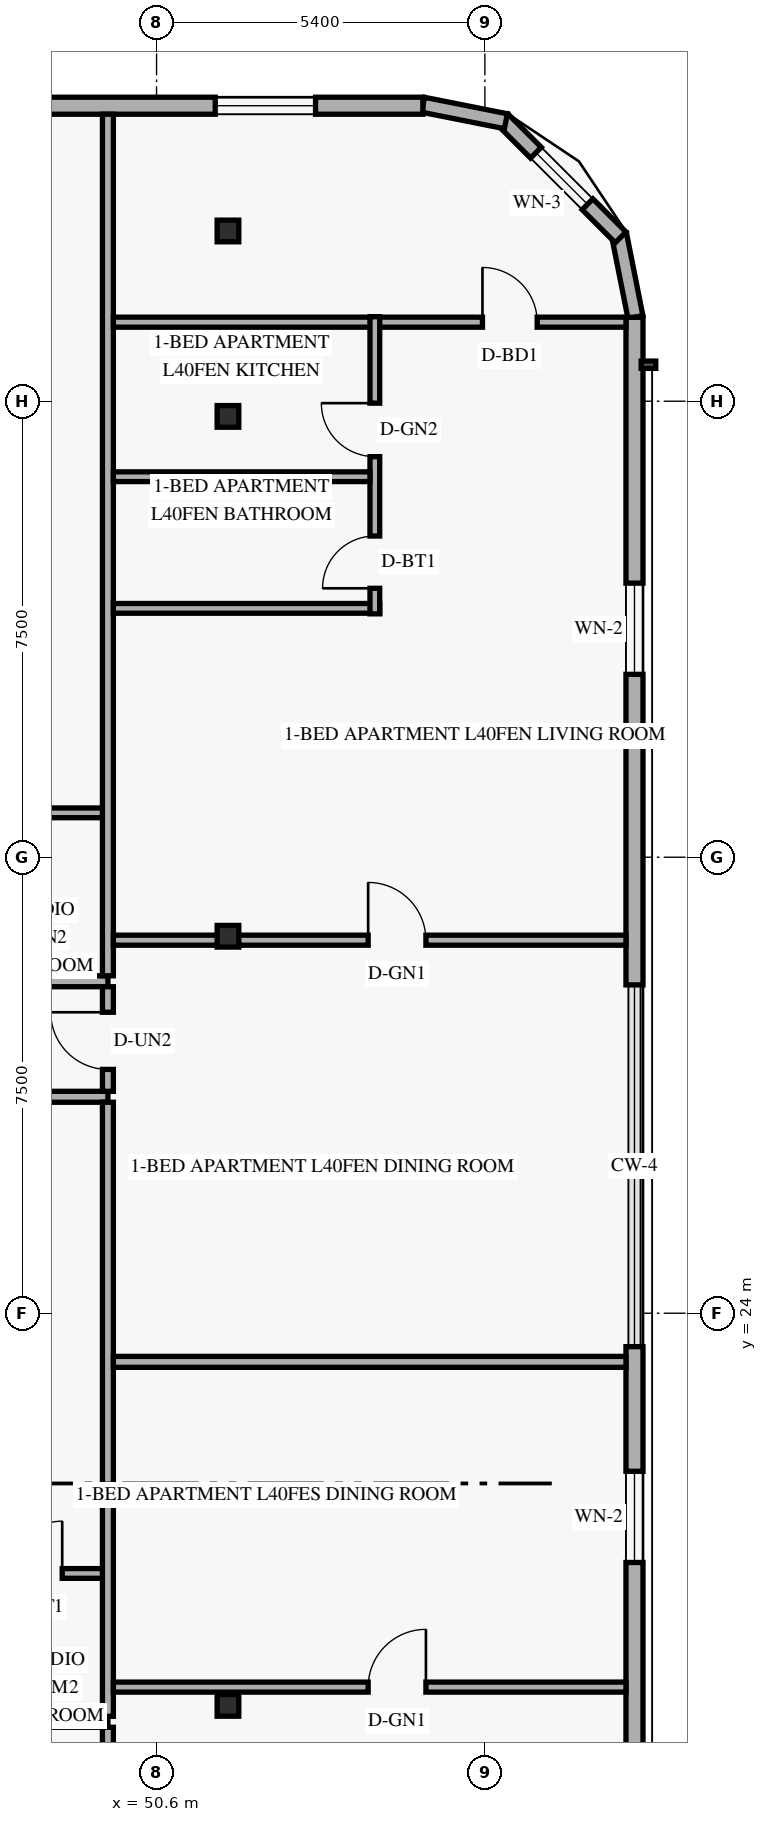
"""IFC4 building model, lengths in metres.
Left out: names, types, materials, properties, quantities, classifications, styles, units other than length and angle.
Written with IfcOpenShell. Run it as: python <this file> out.ifc"""

import sys

from ifc_helpers import new_model, si_unit, direction, frame, frame_2d, origin, origin_2d, place, context, subcontext, project, spatial, rectangle, hollow_rectangle, extrude, element, fill, save


model = new_model("IFC4")
c1 = context("Model", 3, precision=1e-05, world=origin(), true_north=direction((0.0, 1.0)))
c2 = subcontext(c1, "Body", "Model", "MODEL_VIEW")
j1 = project(units=[si_unit("LENGTHUNIT", "METRE"), si_unit("PLANEANGLEUNIT", "RADIAN")], contexts=[c1])
p1 = place(None, origin())
s1 = spatial("IfcSite", under=j1, at=p1, CompositionType="ELEMENT")
p2 = place(p1, origin())
s2 = spatial("IfcBuilding", under=s1, at=p2, CompositionType="ELEMENT")
p3 = place(p2, frame((0.0, 0.0, 155.4)))
s3 = spatial("IfcBuildingStorey", under=s2, at=p3, CompositionType="ELEMENT", Elevation=155.4)
for number, where, z_axis, x_axis in (
    (1, (51.67, 17.55, 0.0), (0.058, 0.0, 0.998), (0.0, 1.0, 0.0)),
    (2, (51.67, 30.2, 0.0), (0.058, 0.0, 0.998), (0.0, 1.0, 0.0)),
    (3, (51.67, 38.75, 0.0), (0.058, 0.0, 0.998), (0.0, 1.0, 0.0)),
    (4, (51.67, 41.8, 0.0), (0.058, 0.0, 0.998), (0.0, 1.0, 0.0)),
):
    element("IfcColumn", number, at=place(p3, frame(where, z_axis=z_axis, x_axis=x_axis)), inside=s3, PredefinedType="COLUMN", context=c2, shape_type="SweptSolid", body=[
        extrude(hollow_rectangle(XDim=0.356, YDim=0.356, WallThickness=0.016, at=origin_2d()), origin(), (0.0, 0.0, 1.0), 3.606),
    ])
p4 = place(p3, frame((58.476, 40.384, 0.0), z_axis=(0.0, 0.0, 1.0), x_axis=(-0.19496651342, 0.980809899341, 0.0)))
e5 = element("IfcWall", 5, at=p4, inside=s3, PredefinedType="SOLIDWALL", context=c2, shape_type="SweptSolid", body=[
    extrude(rectangle(XDim=1.389, YDim=0.25, at=frame_2d((0.694, 0.0))), origin(), (0.0, 0.0, 1.0), 3.36),
])
p5 = place(p3, frame((58.232, 41.695, 0.0), z_axis=(0.0, 0.0, 1.0), x_axis=(-0.707106781187, 0.707106781187, 0.0)))
e6 = element("IfcWall", 6, at=p5, inside=s3, PredefinedType="SOLIDWALL", context=c2, shape_type="SweptSolid", body=[
    extrude(rectangle(XDim=2.739, YDim=0.25, at=frame_2d((1.37, 0.0))), origin(), (0.0, 0.0, 1.0), 3.36),
])
p6 = place(p5, frame((0.77, 0.0, 0.85)))
e7 = element("IfcOpeningElement", 7, at=p6, cuts=e6, PredefinedType="OPENING", context=c2, shape_type="SweptSolid", body=[
    extrude(rectangle(XDim=1.2, YDim=1.5, at=frame_2d((0.6, 0.75))), frame((0.0, 0.135, 0.0), z_axis=(0.0, -1.0, 0.0), x_axis=(1.0, 0.0, 0.0)), (0.0, 0.0, 1.0), 0.27),
])
p7 = place(p3, frame((56.345, 43.605, 0.0), z_axis=(0.0, 0.0, 1.0), x_axis=(-0.980809899341, 0.19496651342, 0.0)))
e8 = element("IfcWall", 8, at=p7, inside=s3, PredefinedType="SOLIDWALL", context=c2, shape_type="SweptSolid", body=[
    extrude(rectangle(XDim=1.389, YDim=0.25, at=frame_2d((0.694, 0.0))), origin(), (0.0, 0.0, 1.0), 3.36),
])
p8 = place(p3, frame((58.46, 7.62, 0.0), z_axis=(0.0, 0.0, 1.0), x_axis=(0.0, 1.0, 0.0)))
e9 = element("IfcWall", 9, at=p8, inside=s3, PredefinedType="SOLIDWALL", context=c2, shape_type="SweptSolid", body=[
    extrude(rectangle(XDim=15.83, YDim=0.28, at=frame_2d((7.915, 0.0))), origin(), (0.0, 0.0, 1.0), 3.36),
])
p9 = place(p8, frame((4.365, 0.0, 0.85)))
e10 = element("IfcOpeningElement", 10, at=p9, cuts=e9, PredefinedType="OPENING", context=c2, shape_type="SweptSolid", body=[
    extrude(rectangle(XDim=1.5, YDim=1.55, at=frame_2d((0.75, 0.775))), frame((0.0, 0.15, 0.0), z_axis=(0.0, -1.0, 0.0), x_axis=(1.0, 0.0, 0.0)), (0.0, 0.0, 1.0), 0.3),
])
p10 = place(p8, frame((12.28, 0.0, 0.85)))
e11 = element("IfcOpeningElement", 11, at=p10, cuts=e9, PredefinedType="OPENING", context=c2, shape_type="SweptSolid", body=[
    extrude(rectangle(XDim=1.5, YDim=1.55, at=frame_2d((0.75, 0.775))), frame((0.0, 0.15, 0.0), z_axis=(0.0, -1.0, 0.0), x_axis=(1.0, 0.0, 0.0)), (0.0, 0.0, 1.0), 0.3),
])
p11 = place(p3, frame((58.46, 29.4, 0.0), z_axis=(0.0, 0.0, 1.0), x_axis=(0.0, 1.0, 0.0)))
e12 = element("IfcWall", 12, at=p11, inside=s3, PredefinedType="SOLIDWALL", context=c2, shape_type="SweptSolid", body=[
    extrude(rectangle(XDim=10.98, YDim=0.28, at=frame_2d((5.49, 0.0))), origin(), (0.0, 0.0, 1.0), 3.36),
])
p12 = place(p11, frame((5.108, 0.0, 0.85)))
e13 = element("IfcOpeningElement", 13, at=p12, cuts=e12, PredefinedType="OPENING", context=c2, shape_type="SweptSolid", body=[
    extrude(rectangle(XDim=1.5, YDim=1.55, at=frame_2d((0.75, 0.775))), frame((0.0, 0.15, 0.0), z_axis=(0.0, -1.0, 0.0), x_axis=(1.0, 0.0, 0.0)), (0.0, 0.0, 1.0), 0.3),
])
p13 = place(p3, frame((54.98, 43.86, 0.0), z_axis=(0.0, 0.0, 1.0), x_axis=(-1.0, 0.0, 0.0)))
e14 = element("IfcWall", 14, at=p13, inside=s3, PredefinedType="SOLIDWALL", context=c2, shape_type="SweptSolid", body=[
    extrude(rectangle(XDim=33.76, YDim=0.28, at=frame_2d((16.88, 0.0))), origin(), (0.0, 0.0, 1.0), 3.36),
])
p14 = place(p13, frame((28.555, 0.0, 0.85)))
e15 = element("IfcOpeningElement", 15, at=p14, cuts=e14, PredefinedType="OPENING", context=c2, shape_type="SweptSolid", body=[
    extrude(rectangle(XDim=1.65, YDim=1.6, at=frame_2d((0.825, 0.8))), frame((0.0, 0.15, 0.0), z_axis=(0.0, -1.0, 0.0), x_axis=(1.0, 0.0, 0.0)), (0.0, 0.0, 1.0), 0.3),
])
p15 = place(p13, frame((21.67, 0.0, 0.85)))
e16 = element("IfcOpeningElement", 16, at=p15, cuts=e14, PredefinedType="OPENING", context=c2, shape_type="SweptSolid", body=[
    extrude(rectangle(XDim=1.65, YDim=1.6, at=frame_2d((0.825, 0.8))), frame((0.0, 0.15, 0.0), z_axis=(0.0, -1.0, 0.0), x_axis=(1.0, 0.0, 0.0)), (0.0, 0.0, 1.0), 0.3),
])
p16 = place(p13, frame((14.996, 0.0, 0.85)))
e17 = element("IfcOpeningElement", 17, at=p16, cuts=e14, PredefinedType="OPENING", context=c2, shape_type="SweptSolid", body=[
    extrude(rectangle(XDim=1.65, YDim=1.6, at=frame_2d((0.825, 0.8))), frame((0.0, 0.15, 0.0), z_axis=(0.0, -1.0, 0.0), x_axis=(1.0, 0.0, 0.0)), (0.0, 0.0, 1.0), 0.3),
])
p17 = place(p13, frame((7.806, 0.0, 0.85)))
e18 = element("IfcOpeningElement", 18, at=p17, cuts=e14, PredefinedType="OPENING", context=c2, shape_type="SweptSolid", body=[
    extrude(rectangle(XDim=1.65, YDim=1.6, at=frame_2d((0.825, 0.8))), frame((0.0, 0.15, 0.0), z_axis=(0.0, -1.0, 0.0), x_axis=(1.0, 0.0, 0.0)), (0.0, 0.0, 1.0), 0.3),
])
p18 = place(p13, frame((1.765, 0.0, 0.85)))
e19 = element("IfcOpeningElement", 19, at=p18, cuts=e14, PredefinedType="OPENING", context=c2, shape_type="SweptSolid", body=[
    extrude(rectangle(XDim=1.65, YDim=1.6, at=frame_2d((0.825, 0.8))), frame((0.0, 0.15, 0.0), z_axis=(0.0, -1.0, 0.0), x_axis=(1.0, 0.0, 0.0)), (0.0, 0.0, 1.0), 0.3),
])
p19 = place(p3, frame((37.64, 17.28, 0.0), z_axis=(0.0, 0.0, 1.0), x_axis=(1.0, 0.0, 0.0)))
e20 = element("IfcWall", 20, at=p19, inside=s3, PredefinedType="STANDARD", context=c2, shape_type="SweptSolid", body=[
    extrude(rectangle(XDim=12.16, YDim=0.18, at=frame_2d((6.08, 0.0))), origin(), (0.0, 0.0, 1.0), 2.73),
])
p20 = place(p19, frame((6.475, 0.0, 0.0)))
e21 = element("IfcOpeningElement", 21, at=p20, cuts=e20, PredefinedType="OPENING", context=c2, shape_type="SweptSolid", body=[
    extrude(rectangle(XDim=0.94, YDim=2.15, at=frame_2d((0.47, 1.075))), frame((0.0, 0.1, 0.0), z_axis=(0.0, -1.0, 0.0), x_axis=(1.0, 0.0, 0.0)), (0.0, 0.0, 1.0), 0.2),
])
p21 = place(p3, frame((37.64, 27.56, 0.0), z_axis=(0.0, 0.0, 1.0), x_axis=(1.0, 0.0, 0.0)))
e22 = element("IfcWall", 22, at=p21, inside=s3, PredefinedType="STANDARD", context=c2, shape_type="SweptSolid", body=[
    extrude(rectangle(XDim=12.16, YDim=0.18, at=frame_2d((6.08, 0.0))), origin(), (0.0, 0.0, 1.0), 2.73),
])
p22 = place(p3, frame((35.51, 29.46, 0.0), z_axis=(0.0, 0.0, 1.0), x_axis=(1.0, 0.0, 0.0)))
e23 = element("IfcWall", 23, at=p22, inside=s3, PredefinedType="STANDARD", context=c2, shape_type="SweptSolid", body=[
    extrude(rectangle(XDim=14.29, YDim=0.18, at=frame_2d((7.145, 0.0))), origin(), (0.0, 0.0, 1.0), 2.73),
])
p23 = place(p22, frame((0.35, 0.0, 0.0)))
e24 = element("IfcOpeningElement", 24, at=p23, cuts=e23, PredefinedType="OPENING", context=c2, shape_type="SweptSolid", body=[
    extrude(rectangle(XDim=0.94, YDim=2.15, at=frame_2d((0.47, 1.075))), frame((0.0, 0.1, 0.0), z_axis=(0.0, -1.0, 0.0), x_axis=(1.0, 0.0, 0.0)), (0.0, 0.0, 1.0), 0.2),
])
p24 = place(p22, frame((7.828, 0.0, 0.0)))
e25 = element("IfcOpeningElement", 25, at=p24, cuts=e23, PredefinedType="OPENING", context=c2, shape_type="SweptSolid", body=[
    extrude(rectangle(XDim=0.94, YDim=2.15, at=frame_2d((0.47, 1.075))), frame((0.0, 0.1, 0.0), z_axis=(0.0, -1.0, 0.0), x_axis=(1.0, 0.0, 0.0)), (0.0, 0.0, 1.0), 0.2),
])
p25 = place(p3, frame((45.13, 32.23, 0.0), z_axis=(0.0, 0.0, 1.0), x_axis=(1.0, 0.0, 0.0)))
e26 = element("IfcWall", 26, at=p25, inside=s3, PredefinedType="PLUMBINGWALL", context=c2, shape_type="SweptSolid", body=[
    extrude(rectangle(XDim=4.67, YDim=0.16, at=frame_2d((2.335, 0.0))), origin(), (0.0, 0.0, 1.0), 2.73),
])
p26 = place(p25, frame((0.35, 0.0, 0.0)))
e27 = element("IfcOpeningElement", 27, at=p26, cuts=e26, PredefinedType="OPENING", context=c2, shape_type="SweptSolid", body=[
    extrude(rectangle(XDim=0.88, YDim=2.12, at=frame_2d((0.44, 1.06))), frame((0.0, 0.09, 0.0), z_axis=(0.0, -1.0, 0.0), x_axis=(1.0, 0.0, 0.0)), (0.0, 0.0, 1.0), 0.18),
])
p27 = place(p25, frame((2.72, 0.0, 0.0)))
e28 = element("IfcOpeningElement", 28, at=p27, cuts=e26, PredefinedType="OPENING", context=c2, shape_type="SweptSolid", body=[
    extrude(rectangle(XDim=0.86, YDim=2.12, at=frame_2d((0.43, 1.06))), frame((0.0, 0.09, 0.0), z_axis=(0.0, -1.0, 0.0), x_axis=(1.0, 0.0, 0.0)), (0.0, 0.0, 1.0), 0.18),
])
p28 = place(p3, frame((45.835, 19.72, 0.0), z_axis=(0.0, 0.0, 1.0), x_axis=(1.0, 0.0, 0.0)))
e29 = element("IfcWall", 29, at=p28, inside=s3, PredefinedType="PLUMBINGWALL", context=c2, shape_type="SweptSolid", body=[
    extrude(rectangle(XDim=3.965, YDim=0.16, at=frame_2d((1.982, 0.0))), origin(), (0.0, 0.0, 1.0), 3.36),
])
p29 = place(p28, frame((0.35, 0.0, 0.0)))
e30 = element("IfcOpeningElement", 30, at=p29, cuts=e29, PredefinedType="OPENING", context=c2, shape_type="SweptSolid", body=[
    extrude(rectangle(XDim=0.88, YDim=2.12, at=frame_2d((0.44, 1.06))), frame((0.0, 0.09, 0.0), z_axis=(0.0, -1.0, 0.0), x_axis=(1.0, 0.0, 0.0)), (0.0, 0.0, 1.0), 0.18),
])
p30 = place(p28, frame((2.354, 0.0, 0.0)))
e31 = element("IfcOpeningElement", 31, at=p30, cuts=e29, PredefinedType="OPENING", context=c2, shape_type="SweptSolid", body=[
    extrude(rectangle(XDim=0.86, YDim=2.12, at=frame_2d((0.43, 1.06))), frame((0.0, 0.09, 0.0), z_axis=(0.0, -1.0, 0.0), x_axis=(1.0, 0.0, 0.0)), (0.0, 0.0, 1.0), 0.18),
])
p31 = place(p3, frame((49.8, 15.67, 0.0), z_axis=(0.0, 0.0, 1.0), x_axis=(0.0, 1.0, 0.0)))
e32 = element("IfcWall", 32, at=p31, inside=s3, PredefinedType="STANDARD", context=c2, shape_type="SweptSolid", body=[
    extrude(rectangle(XDim=1.52, YDim=0.18, at=frame_2d((0.76, 0.0))), origin(), (0.0, 0.0, 1.0), 3.36),
])
p32 = place(p31, frame((0.29, 0.0, 0.0)))
e33 = element("IfcOpeningElement", 33, at=p32, cuts=e32, PredefinedType="OPENING", context=c2, shape_type="SweptSolid", body=[
    extrude(rectangle(XDim=0.94, YDim=2.15, at=frame_2d((0.47, 1.075))), frame((0.0, 0.1, 0.0), z_axis=(0.0, -1.0, 0.0), x_axis=(1.0, 0.0, 0.0)), (0.0, 0.0, 1.0), 0.2),
])
p33 = place(p3, frame((49.8, 27.65, 0.0), z_axis=(0.0, 0.0, 1.0), x_axis=(0.0, 1.0, 0.0)))
e34 = element("IfcWall", 34, at=p33, inside=s3, PredefinedType="STANDARD", context=c2, shape_type="SweptSolid", body=[
    extrude(rectangle(XDim=1.72, YDim=0.18, at=frame_2d((0.86, 0.0))), origin(), (0.0, 0.0, 1.0), 3.36),
])
p34 = place(p33, frame((0.36, 0.0, 0.0)))
e35 = element("IfcOpeningElement", 35, at=p34, cuts=e34, PredefinedType="OPENING", context=c2, shape_type="SweptSolid", body=[
    extrude(rectangle(XDim=0.94, YDim=2.15, at=frame_2d((0.47, 1.075))), frame((0.0, 0.1, 0.0), z_axis=(0.0, -1.0, 0.0), x_axis=(1.0, 0.0, 0.0)), (0.0, 0.0, 1.0), 0.2),
])
p35 = place(p3, frame((49.8, 17.37, 0.0), z_axis=(0.0, 0.0, 1.0), x_axis=(0.0, 1.0, 0.0)))
e36 = element("IfcWall", 36, at=p35, inside=s3, PredefinedType="PARTITIONING", context=c2, shape_type="SweptSolid", body=[
    extrude(rectangle(XDim=10.1, YDim=0.18, at=frame_2d((5.05, 0.0))), origin(), (0.0, 0.0, 1.0), 2.73),
])
p36 = place(p3, frame((49.8, 29.55, 0.0), z_axis=(0.0, 0.0, 1.0), x_axis=(0.0, 1.0, 0.0)))
e37 = element("IfcWall", 37, at=p36, inside=s3, PredefinedType="PARTITIONING", context=c2, shape_type="SweptSolid", body=[
    extrude(rectangle(XDim=14.17, YDim=0.18, at=frame_2d((7.085, 0.0))), origin(), (0.0, 0.0, 1.0), 2.73),
])
p37 = place(p3, frame((49.89, 23.2, 0.0), z_axis=(0.0, 0.0, 1.0), x_axis=(1.0, 0.0, 0.0)))
e38 = element("IfcWall", 38, at=p37, inside=s3, PredefinedType="PARTITIONING", context=c2, shape_type="SweptSolid", body=[
    extrude(rectangle(XDim=8.43, YDim=0.18, at=frame_2d((4.215, 0.0))), origin(), (0.0, 0.0, 1.0), 2.879),
])
p38 = place(p3, frame((49.89, 17.851, 0.0), z_axis=(0.0, 0.0, 1.0), x_axis=(1.0, 0.0, 0.0)))
e39 = element("IfcWall", 39, at=p38, inside=s3, PredefinedType="PARTITIONING", context=c2, shape_type="SweptSolid", body=[
    extrude(rectangle(XDim=8.43, YDim=0.165, at=frame_2d((4.215, 0.0))), origin(), (0.0, 0.0, 1.0), 2.879),
])
p39 = place(p38, frame((4.19, 0.0, 0.0)))
e40 = element("IfcOpeningElement", 40, at=p39, cuts=e39, PredefinedType="OPENING", context=c2, shape_type="SweptSolid", body=[
    extrude(rectangle(XDim=0.95, YDim=2.15, at=frame_2d((0.475, 1.075))), frame((0.0, 0.093, 0.0), z_axis=(0.0, -1.0, 0.0), x_axis=(1.0, 0.0, 0.0)), (0.0, 0.0, 1.0), 0.185),
])
p40 = place(p3, frame((49.89, 40.3, 0.0), z_axis=(0.0, 0.0, 1.0), x_axis=(1.0, 0.0, 0.0)))
e41 = element("IfcWall", 41, at=p40, inside=s3, PredefinedType="PARTITIONING", context=c2, shape_type="SweptSolid", body=[
    extrude(rectangle(XDim=8.43, YDim=0.165, at=frame_2d((4.215, 0.0))), origin(), (0.0, 0.0, 1.0), 2.879),
])
p41 = place(p40, frame((6.07, 0.0, 0.0)))
e42 = element("IfcOpeningElement", 42, at=p41, cuts=e41, PredefinedType="OPENING", context=c2, shape_type="SweptSolid", body=[
    extrude(rectangle(XDim=0.9, YDim=2.14, at=frame_2d((0.45, 1.07))), frame((0.0, 0.093, 0.0), z_axis=(0.0, -1.0, 0.0), x_axis=(1.0, 0.0, 0.0)), (0.0, 0.0, 1.0), 0.185),
])
p42 = place(p3, frame((49.89, 35.593, 0.0), z_axis=(0.0, 0.0, 1.0), x_axis=(1.0, 0.0, 0.0)))
e43 = element("IfcWall", 43, at=p42, inside=s3, PredefinedType="PLUMBINGWALL", context=c2, shape_type="SweptSolid", body=[
    extrude(rectangle(XDim=4.38, YDim=0.16, at=frame_2d((2.19, 0.0))), origin(), (0.0, 0.0, 1.0), 2.879),
])
p43 = place(p3, frame((54.19, 35.503, 0.0), z_axis=(0.0, 0.0, 1.0), x_axis=(0.0, 1.0, 0.0)))
e44 = element("IfcWall", 44, at=p43, inside=s3, PredefinedType="PLUMBINGWALL", context=c2, shape_type="SweptSolid", body=[
    extrude(rectangle(XDim=4.887, YDim=0.16, at=frame_2d((2.443, 0.0))), origin(), (0.0, 0.0, 1.0), 3.36),
])
p44 = place(p43, frame((0.42, 0.0, 0.0)))
e45 = element("IfcOpeningElement", 45, at=p44, cuts=e44, PredefinedType="OPENING", context=c2, shape_type="SweptSolid", body=[
    extrude(rectangle(XDim=0.86, YDim=2.12, at=frame_2d((0.43, 1.06))), frame((0.0, 0.09, 0.0), z_axis=(0.0, -1.0, 0.0), x_axis=(1.0, 0.0, 0.0)), (0.0, 0.0, 1.0), 0.18),
])
p45 = place(p43, frame((2.585, 0.0, 0.0)))
e46 = element("IfcOpeningElement", 46, at=p45, cuts=e44, PredefinedType="OPENING", context=c2, shape_type="SweptSolid", body=[
    extrude(rectangle(XDim=0.88, YDim=2.12, at=frame_2d((0.44, 1.06))), frame((0.0, 0.09, 0.0), z_axis=(0.0, -1.0, 0.0), x_axis=(1.0, 0.0, 0.0)), (0.0, 0.0, 1.0), 0.18),
])
p46 = place(p3, frame((49.89, 37.758, 0.0), z_axis=(0.0, 0.0, 1.0), x_axis=(1.0, 0.0, 0.0)))
e47 = element("IfcWall", 47, at=p46, inside=s3, PredefinedType="PLUMBINGWALL", context=c2, shape_type="SweptSolid", body=[
    extrude(rectangle(XDim=4.22, YDim=0.16, at=frame_2d((2.11, 0.0))), origin(), (0.0, 0.0, 1.0), 2.879),
])
p47 = place(p3, frame((49.89, 30.135, 0.0), z_axis=(0.0, 0.0, 1.0), x_axis=(1.0, 0.0, 0.0)))
e48 = element("IfcWall", 48, at=p47, inside=s3, PredefinedType="PARTITIONING", context=c2, shape_type="SweptSolid", body=[
    extrude(rectangle(XDim=8.43, YDim=0.165, at=frame_2d((4.215, 0.0))), origin(), (0.0, 0.0, 1.0), 2.73),
])
p48 = place(p47, frame((4.19, 0.0, 0.0)))
e49 = element("IfcOpeningElement", 49, at=p48, cuts=e48, PredefinedType="OPENING", context=c2, shape_type="SweptSolid", body=[
    extrude(rectangle(XDim=0.95, YDim=2.15, at=frame_2d((0.475, 1.075))), frame((0.0, 0.093, 0.0), z_axis=(0.0, -1.0, 0.0), x_axis=(1.0, 0.0, 0.0)), (0.0, 0.0, 1.0), 0.185),
])
p49 = place(p6, origin())
e50 = element("IfcWindow", 50, at=p49, inside=s3, PartitioningType="SINGLE_PANEL", PredefinedType="WINDOW", context=c2, shape_type="SweptSolid", body=[
    extrude(rectangle(XDim=1.2, YDim=1.5, at=frame_2d((0.6, 0.75))), frame((0.0, 0.03, 0.0), z_axis=(0.0, -1.0, 0.0), x_axis=(1.0, 0.0, 0.0)), (0.0, 0.0, 1.0), 0.06),
])
fill(e7, e50)
p50 = place(p10, origin())
e51 = element("IfcWindow", 51, at=p50, inside=s3, PartitioningType="SINGLE_PANEL", PredefinedType="WINDOW", context=c2, shape_type="SweptSolid", body=[
    extrude(rectangle(XDim=1.5, YDim=1.55, at=frame_2d((0.75, 0.775))), frame((0.0, 0.03, 0.0), z_axis=(0.0, -1.0, 0.0), x_axis=(1.0, 0.0, 0.0)), (0.0, 0.0, 1.0), 0.06),
])
fill(e11, e51)
p51 = place(p12, origin())
e52 = element("IfcWindow", 52, at=p51, inside=s3, PartitioningType="SINGLE_PANEL", PredefinedType="WINDOW", context=c2, shape_type="SweptSolid", body=[
    extrude(rectangle(XDim=1.5, YDim=1.55, at=frame_2d((0.75, 0.775))), frame((0.0, 0.03, 0.0), z_axis=(0.0, -1.0, 0.0), x_axis=(1.0, 0.0, 0.0)), (0.0, 0.0, 1.0), 0.06),
])
fill(e13, e52)
p52 = place(p18, origin())
e53 = element("IfcWindow", 53, at=p52, inside=s3, PartitioningType="SINGLE_PANEL", PredefinedType="WINDOW", context=c2, shape_type="SweptSolid", body=[
    extrude(rectangle(XDim=1.65, YDim=1.6, at=frame_2d((0.825, 0.8))), frame((0.0, 0.03, 0.0), z_axis=(0.0, -1.0, 0.0), x_axis=(1.0, 0.0, 0.0)), (0.0, 0.0, 1.0), 0.06),
])
fill(e19, e53)
p53 = place(p30, origin())
e54 = element("IfcDoor", 54, at=p53, inside=s3, OperationType="SINGLE_SWING_RIGHT", PredefinedType="DOOR", context=c2, shape_type="SweptSolid", body=[
    extrude(rectangle(XDim=0.86, YDim=2.12, at=frame_2d((0.43, 1.06))), frame((0.0, 0.025, 0.0), z_axis=(0.0, -1.0, 0.0), x_axis=(1.0, 0.0, 0.0)), (0.0, 0.0, 1.0), 0.05),
])
fill(e31, e54)
p54 = place(p39, origin())
e55 = element("IfcDoor", 55, at=p54, inside=s3, OperationType="SINGLE_SWING_RIGHT", PredefinedType="DOOR", context=c2, shape_type="SweptSolid", body=[
    extrude(rectangle(XDim=0.95, YDim=2.15, at=frame_2d((0.475, 1.075))), frame((0.0, 0.025, 0.0), z_axis=(0.0, -1.0, 0.0), x_axis=(1.0, 0.0, 0.0)), (0.0, 0.0, 1.0), 0.05),
])
fill(e40, e55)
p55 = place(p48, origin())
e56 = element("IfcDoor", 56, at=p55, inside=s3, OperationType="SINGLE_SWING_LEFT", PredefinedType="DOOR", context=c2, shape_type="SweptSolid", body=[
    extrude(rectangle(XDim=0.95, YDim=2.15, at=frame_2d((0.475, 1.075))), frame((0.0, 0.025, 0.0), z_axis=(0.0, -1.0, 0.0), x_axis=(1.0, 0.0, 0.0)), (0.0, 0.0, 1.0), 0.05),
])
fill(e49, e56)
p56 = place(p34, origin())
e57 = element("IfcDoor", 57, at=p56, inside=s3, OperationType="SINGLE_SWING_RIGHT", PredefinedType="DOOR", context=c2, shape_type="SweptSolid", body=[
    extrude(rectangle(XDim=0.94, YDim=2.15, at=frame_2d((0.47, 1.075))), frame((0.0, 0.025, 0.0), z_axis=(0.0, -1.0, 0.0), x_axis=(1.0, 0.0, 0.0)), (0.0, 0.0, 1.0), 0.05),
])
fill(e35, e57)
p57 = place(p44, origin())
e58 = element("IfcDoor", 58, at=p57, inside=s3, OperationType="SINGLE_SWING_LEFT", PredefinedType="DOOR", context=c2, shape_type="SweptSolid", body=[
    extrude(rectangle(XDim=0.86, YDim=2.12, at=frame_2d((0.43, 1.06))), frame((0.0, 0.025, 0.0), z_axis=(0.0, -1.0, 0.0), x_axis=(1.0, 0.0, 0.0)), (0.0, 0.0, 1.0), 0.05),
])
fill(e45, e58)
p58 = place(p45, origin())
e59 = element("IfcDoor", 59, at=p58, inside=s3, OperationType="SINGLE_SWING_RIGHT", PredefinedType="DOOR", context=c2, shape_type="SweptSolid", body=[
    extrude(rectangle(XDim=0.88, YDim=2.12, at=frame_2d((0.44, 1.06))), frame((0.0, 0.025, 0.0), z_axis=(0.0, -1.0, 0.0), x_axis=(1.0, 0.0, 0.0)), (0.0, 0.0, 1.0), 0.05),
])
fill(e46, e59)
p59 = place(p41, origin())
e60 = element("IfcDoor", 60, at=p59, inside=s3, OperationType="SINGLE_SWING_LEFT", PredefinedType="DOOR", context=c2, shape_type="SweptSolid", body=[
    extrude(rectangle(XDim=0.9, YDim=2.14, at=frame_2d((0.45, 1.07))), frame((0.0, 0.025, 0.0), z_axis=(0.0, -1.0, 0.0), x_axis=(1.0, 0.0, 0.0)), (0.0, 0.0, 1.0), 0.05),
])
fill(e42, e60)
save(model, sys.argv[1])
